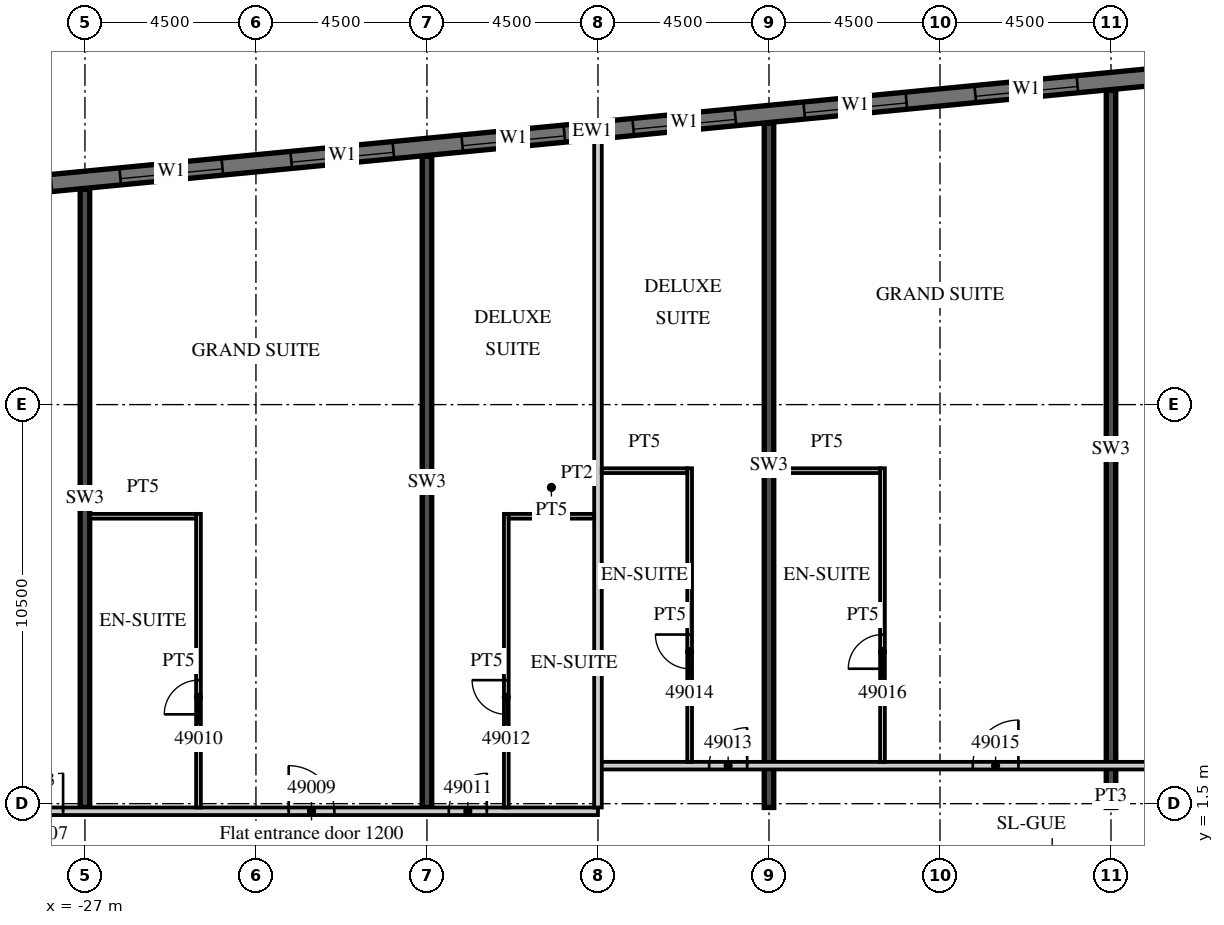
"""IFC4 building model, lengths in metres.
Left out: names, types, materials, properties, quantities, classifications, styles, units other than length and angle.
Written with IfcOpenShell. Run it as: python <this file> out.ifc"""

import sys

from ifc_helpers import new_model, si_unit, direction, frame, frame_2d, origin, place, context, subcontext, project, spatial, rectangle, extrude, element, fill, save


model = new_model("IFC4")
c1 = context("Model", 3, precision=1e-05, world=origin(), true_north=direction((0.0, 1.0)))
c2 = subcontext(c1, "Body", "Model", "MODEL_VIEW")
j1 = project(units=[si_unit("LENGTHUNIT", "METRE"), si_unit("PLANEANGLEUNIT", "RADIAN")], contexts=[c1])
p1 = place(None, origin())
s1 = spatial("IfcSite", under=j1, at=p1, CompositionType="ELEMENT")
p2 = place(p1, origin())
s2 = spatial("IfcBuilding", under=s1, at=p2, CompositionType="ELEMENT")
p3 = place(p2, frame((0.0, 0.0, 203.2)))
s3 = spatial("IfcBuildingStorey", under=s2, at=p3, CompositionType="ELEMENT", Elevation=203.2)
p4 = place(p3, frame((-27.0, 1.4, 0.0), z_axis=(0.0, 0.0, 1.0), x_axis=(0.0, 1.0, 0.0)))
e1 = element("IfcWall", 1, at=p4, inside=s3, PredefinedType="SHEAR", context=c2, shape_type="SweptSolid", body=[
    extrude(rectangle(XDim=16.268, YDim=0.25, at=frame_2d((8.134, 0.0))), origin(), (0.0, 0.0, 1.0), 3.0),
])
p5 = place(p3, frame((-18.0, 1.4, 0.0), z_axis=(0.0, 0.0, 1.0), x_axis=(0.0, 1.0, 0.0)))
e2 = element("IfcWall", 2, at=p5, inside=s3, PredefinedType="SHEAR", context=c2, shape_type="SweptSolid", body=[
    extrude(rectangle(XDim=17.134, YDim=0.25, at=frame_2d((8.567, 0.0))), origin(), (0.0, 0.0, 1.0), 3.0),
])
p6 = place(p3, frame((-9.0, 1.4, 0.0), z_axis=(0.0, 0.0, 1.0), x_axis=(0.0, 1.0, 0.0)))
e3 = element("IfcWall", 3, at=p6, inside=s3, PredefinedType="SHEAR", context=c2, shape_type="SweptSolid", body=[
    extrude(rectangle(XDim=18.001, YDim=0.25, at=frame_2d((9.0, 0.0))), origin(), (0.0, 0.0, 1.0), 3.0),
])
p7 = place(p3, frame((0.0, 1.4, 0.0), z_axis=(0.0, 0.0, 1.0), x_axis=(0.0, 1.0, 0.0)))
e4 = element("IfcWall", 4, at=p7, inside=s3, PredefinedType="SHEAR", context=c2, shape_type="SweptSolid", body=[
    extrude(rectangle(XDim=18.867, YDim=0.25, at=frame_2d((9.434, 0.0))), origin(), (0.0, 0.0, 1.0), 3.0),
])
p8 = place(p3, frame((13.521, 21.817, 0.0), z_axis=(0.0, 0.0, 1.0), x_axis=(-0.995396508751, -0.095842529008, 0.0)))
e5 = element("IfcWall", 5, at=p8, inside=s3, PredefinedType="SOLIDWALL", context=c2, shape_type="SweptSolid", body=[
    extrude(rectangle(XDim=54.591, YDim=0.45, at=frame_2d((27.296, 0.0))), origin(), (0.0, 0.0, 1.0), 3.0),
])
p9 = place(p8, frame((0.91, 0.0, 0.45)))
e6 = element("IfcOpeningElement", 6, at=p9, cuts=e5, PredefinedType="OPENING", context=c2, shape_type="SweptSolid", body=[
    extrude(rectangle(XDim=2.7, YDim=2.25, at=frame_2d((1.35, 1.125))), frame((0.0, 0.235, 0.0), z_axis=(0.0, -1.0, 0.0), x_axis=(1.0, 0.0, 0.0)), (0.0, 0.0, 1.0), 0.47),
])
p10 = place(p8, frame((5.431, 0.0, 0.45)))
e7 = element("IfcOpeningElement", 7, at=p10, cuts=e5, PredefinedType="OPENING", context=c2, shape_type="SweptSolid", body=[
    extrude(rectangle(XDim=2.7, YDim=2.25, at=frame_2d((1.35, 1.125))), frame((0.0, 0.235, 0.0), z_axis=(0.0, -1.0, 0.0), x_axis=(1.0, 0.0, 0.0)), (0.0, 0.0, 1.0), 0.47),
])
p11 = place(p8, frame((9.952, 0.0, 0.45)))
e8 = element("IfcOpeningElement", 8, at=p11, cuts=e5, PredefinedType="OPENING", context=c2, shape_type="SweptSolid", body=[
    extrude(rectangle(XDim=2.7, YDim=2.25, at=frame_2d((1.35, 1.125))), frame((0.0, 0.235, 0.0), z_axis=(0.0, -1.0, 0.0), x_axis=(1.0, 0.0, 0.0)), (0.0, 0.0, 1.0), 0.47),
])
p12 = place(p8, frame((14.473, 0.0, 0.45)))
e9 = element("IfcOpeningElement", 9, at=p12, cuts=e5, PredefinedType="OPENING", context=c2, shape_type="SweptSolid", body=[
    extrude(rectangle(XDim=2.7, YDim=2.25, at=frame_2d((1.35, 1.125))), frame((0.0, 0.235, 0.0), z_axis=(0.0, -1.0, 0.0), x_axis=(1.0, 0.0, 0.0)), (0.0, 0.0, 1.0), 0.47),
])
p13 = place(p8, frame((18.994, 0.0, 0.45)))
e10 = element("IfcOpeningElement", 10, at=p13, cuts=e5, PredefinedType="OPENING", context=c2, shape_type="SweptSolid", body=[
    extrude(rectangle(XDim=2.7, YDim=2.25, at=frame_2d((1.35, 1.125))), frame((0.0, 0.235, 0.0), z_axis=(0.0, -1.0, 0.0), x_axis=(1.0, 0.0, 0.0)), (0.0, 0.0, 1.0), 0.47),
])
p14 = place(p8, frame((23.514, 0.0, 0.45)))
e11 = element("IfcOpeningElement", 11, at=p14, cuts=e5, PredefinedType="OPENING", context=c2, shape_type="SweptSolid", body=[
    extrude(rectangle(XDim=2.7, YDim=2.25, at=frame_2d((1.35, 1.125))), frame((0.0, 0.235, 0.0), z_axis=(0.0, -1.0, 0.0), x_axis=(1.0, 0.0, 0.0)), (0.0, 0.0, 1.0), 0.47),
])
p15 = place(p8, frame((28.035, 0.0, 0.45)))
e12 = element("IfcOpeningElement", 12, at=p15, cuts=e5, PredefinedType="OPENING", context=c2, shape_type="SweptSolid", body=[
    extrude(rectangle(XDim=2.7, YDim=2.25, at=frame_2d((1.35, 1.125))), frame((0.0, 0.235, 0.0), z_axis=(0.0, -1.0, 0.0), x_axis=(1.0, 0.0, 0.0)), (0.0, 0.0, 1.0), 0.47),
])
p16 = place(p8, frame((32.556, 0.0, 0.45)))
e13 = element("IfcOpeningElement", 13, at=p16, cuts=e5, PredefinedType="OPENING", context=c2, shape_type="SweptSolid", body=[
    extrude(rectangle(XDim=2.7, YDim=2.25, at=frame_2d((1.35, 1.125))), frame((0.0, 0.235, 0.0), z_axis=(0.0, -1.0, 0.0), x_axis=(1.0, 0.0, 0.0)), (0.0, 0.0, 1.0), 0.47),
])
p17 = place(p8, frame((37.077, 0.0, 0.45)))
e14 = element("IfcOpeningElement", 14, at=p17, cuts=e5, PredefinedType="OPENING", context=c2, shape_type="SweptSolid", body=[
    extrude(rectangle(XDim=2.7, YDim=2.25, at=frame_2d((1.35, 1.125))), frame((0.0, 0.235, 0.0), z_axis=(0.0, -1.0, 0.0), x_axis=(1.0, 0.0, 0.0)), (0.0, 0.0, 1.0), 0.47),
])
p18 = place(p8, frame((41.598, 0.0, 0.45)))
e15 = element("IfcOpeningElement", 15, at=p18, cuts=e5, PredefinedType="OPENING", context=c2, shape_type="SweptSolid", body=[
    extrude(rectangle(XDim=2.7, YDim=2.25, at=frame_2d((1.35, 1.125))), frame((0.0, 0.235, 0.0), z_axis=(0.0, -1.0, 0.0), x_axis=(1.0, 0.0, 0.0)), (0.0, 0.0, 1.0), 0.47),
])
p19 = place(p8, frame((46.118, 0.0, 0.45)))
e16 = element("IfcOpeningElement", 16, at=p19, cuts=e5, PredefinedType="OPENING", context=c2, shape_type="SweptSolid", body=[
    extrude(rectangle(XDim=2.7, YDim=2.25, at=frame_2d((1.35, 1.125))), frame((0.0, 0.235, 0.0), z_axis=(0.0, -1.0, 0.0), x_axis=(1.0, 0.0, 0.0)), (0.0, 0.0, 1.0), 0.47),
])
p20 = place(p8, frame((50.629, 0.0, 0.45)))
e17 = element("IfcOpeningElement", 17, at=p20, cuts=e5, PredefinedType="OPENING", context=c2, shape_type="SweptSolid", body=[
    extrude(rectangle(XDim=2.7, YDim=2.25, at=frame_2d((1.35, 1.125))), frame((0.0, 0.235, 0.0), z_axis=(0.0, -1.0, 0.0), x_axis=(1.0, 0.0, 0.0)), (0.0, 0.0, 1.0), 0.47),
])
p21 = place(p3, frame((-42.913, 1.3, 0.0), z_axis=(0.0, 0.0, 1.0), x_axis=(1.0, 0.0, 0.0)))
e18 = element("IfcWall", 18, at=p21, inside=s3, PredefinedType="PARTITIONING", context=c2, shape_type="SweptSolid", body=[
    extrude(rectangle(XDim=29.413, YDim=0.2, at=frame_2d((14.707, 0.0))), origin(), (0.0, 0.0, 1.0), 3.0),
])
p22 = place(p21, frame((0.15, 0.0, 0.0)))
e19 = element("IfcOpeningElement", 19, at=p22, cuts=e18, PredefinedType="OPENING", context=c2, shape_type="SweptSolid", body=[
    extrude(rectangle(XDim=0.9, YDim=2.1, at=frame_2d((0.45, 1.05))), frame((0.0, 0.11, 0.0), z_axis=(0.0, -1.0, 0.0), x_axis=(1.0, 0.0, 0.0)), (0.0, 0.0, 1.0), 0.22),
])
p23 = place(p21, frame((2.963, 0.0, 0.0)))
e20 = element("IfcOpeningElement", 20, at=p23, cuts=e18, PredefinedType="OPENING", context=c2, shape_type="SweptSolid", body=[
    extrude(rectangle(XDim=1.0, YDim=2.1, at=frame_2d((0.5, 1.05))), frame((0.0, 0.11, 0.0), z_axis=(0.0, -1.0, 0.0), x_axis=(1.0, 0.0, 0.0)), (0.0, 0.0, 1.0), 0.22),
])
p24 = place(p21, frame((9.863, 0.0, 0.0)))
e21 = element("IfcOpeningElement", 21, at=p24, cuts=e18, PredefinedType="OPENING", context=c2, shape_type="SweptSolid", body=[
    extrude(rectangle(XDim=1.0, YDim=2.1, at=frame_2d((0.5, 1.05))), frame((0.0, 0.11, 0.0), z_axis=(0.0, -1.0, 0.0), x_axis=(1.0, 0.0, 0.0)), (0.0, 0.0, 1.0), 0.22),
])
p25 = place(p21, frame((14.338, 0.0, 0.0)))
e22 = element("IfcOpeningElement", 22, at=p25, cuts=e18, PredefinedType="OPENING", context=c2, shape_type="SweptSolid", body=[
    extrude(rectangle(XDim=1.0, YDim=2.1, at=frame_2d((0.5, 1.05))), frame((0.0, 0.11, 0.0), z_axis=(0.0, -1.0, 0.0), x_axis=(1.0, 0.0, 0.0)), (0.0, 0.0, 1.0), 0.22),
])
p26 = place(p21, frame((21.275, 0.0, 0.0)))
e23 = element("IfcOpeningElement", 23, at=p26, cuts=e18, PredefinedType="OPENING", context=c2, shape_type="SweptSolid", body=[
    extrude(rectangle(XDim=1.2, YDim=2.1, at=frame_2d((0.6, 1.05))), frame((0.0, 0.11, 0.0), z_axis=(0.0, -1.0, 0.0), x_axis=(1.0, 0.0, 0.0)), (0.0, 0.0, 1.0), 0.22),
])
p27 = place(p21, frame((25.488, 0.0, 0.0)))
e24 = element("IfcOpeningElement", 24, at=p27, cuts=e18, PredefinedType="OPENING", context=c2, shape_type="SweptSolid", body=[
    extrude(rectangle(XDim=1.0, YDim=2.1, at=frame_2d((0.5, 1.05))), frame((0.0, 0.11, 0.0), z_axis=(0.0, -1.0, 0.0), x_axis=(1.0, 0.0, 0.0)), (0.0, 0.0, 1.0), 0.22),
])
p28 = place(p3, frame((-13.5, 2.5, 0.0), z_axis=(0.0, 0.0, 1.0), x_axis=(1.0, 0.0, 0.0)))
e25 = element("IfcWall", 25, at=p28, inside=s3, PredefinedType="PARTITIONING", context=c2, shape_type="SweptSolid", body=[
    extrude(rectangle(XDim=27.0, YDim=0.2, at=frame_2d((13.5, 0.0))), origin(), (0.0, 0.0, 1.0), 3.0),
])
p29 = place(p28, frame((2.925, 0.0, 0.0)))
e26 = element("IfcOpeningElement", 26, at=p29, cuts=e25, PredefinedType="OPENING", context=c2, shape_type="SweptSolid", body=[
    extrude(rectangle(XDim=1.0, YDim=2.1, at=frame_2d((0.5, 1.05))), frame((0.0, 0.11, 0.0), z_axis=(0.0, -1.0, 0.0), x_axis=(1.0, 0.0, 0.0)), (0.0, 0.0, 1.0), 0.22),
])
p30 = place(p28, frame((9.863, 0.0, 0.0)))
e27 = element("IfcOpeningElement", 27, at=p30, cuts=e25, PredefinedType="OPENING", context=c2, shape_type="SweptSolid", body=[
    extrude(rectangle(XDim=1.2, YDim=2.1, at=frame_2d((0.6, 1.05))), frame((0.0, 0.11, 0.0), z_axis=(0.0, -1.0, 0.0), x_axis=(1.0, 0.0, 0.0)), (0.0, 0.0, 1.0), 0.22),
])
p31 = place(p28, frame((15.938, 0.0, 0.0)))
e28 = element("IfcOpeningElement", 28, at=p31, cuts=e25, PredefinedType="OPENING", context=c2, shape_type="SweptSolid", body=[
    extrude(rectangle(XDim=1.2, YDim=2.1, at=frame_2d((0.6, 1.05))), frame((0.0, 0.11, 0.0), z_axis=(0.0, -1.0, 0.0), x_axis=(1.0, 0.0, 0.0)), (0.0, 0.0, 1.0), 0.22),
])
p32 = place(p28, frame((23.075, 0.0, 0.0)))
e29 = element("IfcOpeningElement", 29, at=p32, cuts=e25, PredefinedType="OPENING", context=c2, shape_type="SweptSolid", body=[
    extrude(rectangle(XDim=1.0, YDim=2.1, at=frame_2d((0.5, 1.05))), frame((0.0, 0.11, 0.0), z_axis=(0.0, -1.0, 0.0), x_axis=(1.0, 0.0, 0.0)), (0.0, 0.0, 1.0), 0.22),
])
p33 = place(p3, frame((-24.012, 1.4, 0.0), z_axis=(0.0, 0.0, 1.0), x_axis=(0.0, 1.0, 0.0)))
e30 = element("IfcWall", 30, at=p33, inside=s3, PredefinedType="PARTITIONING", context=c2, shape_type="SweptSolid", body=[
    extrude(rectangle(XDim=7.725, YDim=0.125, at=frame_2d((3.863, 0.0))), origin(), (0.0, 0.0, 1.0), 3.0),
])
p34 = place(p33, frame((2.45, 0.0, 0.0)))
e31 = element("IfcOpeningElement", 31, at=p34, cuts=e30, PredefinedType="OPENING", context=c2, shape_type="SweptSolid", body=[
    extrude(rectangle(XDim=0.9, YDim=2.1, at=frame_2d((0.45, 1.05))), frame((0.0, 0.073, 0.0), z_axis=(0.0, -1.0, 0.0), x_axis=(1.0, 0.0, 0.0)), (0.0, 0.0, 1.0), 0.145),
])
p35 = place(p3, frame((-26.875, 9.062, 0.0), z_axis=(0.0, 0.0, 1.0), x_axis=(1.0, 0.0, 0.0)))
e32 = element("IfcWall", 32, at=p35, inside=s3, PredefinedType="PARTITIONING", context=c2, shape_type="SweptSolid", body=[
    extrude(rectangle(XDim=2.8, YDim=0.125, at=frame_2d((1.4, 0.0))), origin(), (0.0, 0.0, 1.0), 3.0),
])
p36 = place(p3, frame((-13.5, 1.4, 0.0), z_axis=(0.0, 0.0, 1.0), x_axis=(0.0, 1.0, 0.0)))
e33 = element("IfcWall", 33, at=p36, inside=s3, PredefinedType="PARTITIONING", context=c2, shape_type="SweptSolid", body=[
    extrude(rectangle(XDim=17.59, YDim=0.2, at=frame_2d((8.795, 0.0))), origin(), (0.0, 0.0, 1.0), 3.0),
])
p37 = place(p3, frame((-15.912, 1.4, 0.0), z_axis=(0.0, 0.0, 1.0), x_axis=(0.0, 1.0, 0.0)))
e34 = element("IfcWall", 34, at=p37, inside=s3, PredefinedType="PARTITIONING", context=c2, shape_type="SweptSolid", body=[
    extrude(rectangle(XDim=7.725, YDim=0.125, at=frame_2d((3.863, 0.0))), origin(), (0.0, 0.0, 1.0), 3.0),
])
p38 = place(p37, frame((2.45, 0.0, 0.0)))
e35 = element("IfcOpeningElement", 35, at=p38, cuts=e34, PredefinedType="OPENING", context=c2, shape_type="SweptSolid", body=[
    extrude(rectangle(XDim=0.9, YDim=2.1, at=frame_2d((0.45, 1.05))), frame((0.0, 0.073, 0.0), z_axis=(0.0, -1.0, 0.0), x_axis=(1.0, 0.0, 0.0)), (0.0, 0.0, 1.0), 0.145),
])
p39 = place(p3, frame((-15.85, 9.062, 0.0), z_axis=(0.0, 0.0, 1.0), x_axis=(1.0, 0.0, 0.0)))
e36 = element("IfcWall", 36, at=p39, inside=s3, PredefinedType="PARTITIONING", context=c2, shape_type="SweptSolid", body=[
    extrude(rectangle(XDim=2.25, YDim=0.125, at=frame_2d((1.125, 0.0))), origin(), (0.0, 0.0, 1.0), 3.0),
])
p40 = place(p3, frame((-11.088, 2.6, 0.0), z_axis=(0.0, 0.0, 1.0), x_axis=(0.0, 1.0, 0.0)))
e37 = element("IfcWall", 37, at=p40, inside=s3, PredefinedType="PARTITIONING", context=c2, shape_type="SweptSolid", body=[
    extrude(rectangle(XDim=7.725, YDim=0.125, at=frame_2d((3.862, 0.0))), origin(), (0.0, 0.0, 1.0), 3.0),
])
p41 = place(p40, frame((2.45, 0.0, 0.0)))
e38 = element("IfcOpeningElement", 38, at=p41, cuts=e37, PredefinedType="OPENING", context=c2, shape_type="SweptSolid", body=[
    extrude(rectangle(XDim=0.9, YDim=2.1, at=frame_2d((0.45, 1.05))), frame((0.0, 0.073, 0.0), z_axis=(0.0, -1.0, 0.0), x_axis=(1.0, 0.0, 0.0)), (0.0, 0.0, 1.0), 0.145),
])
p42 = place(p3, frame((-13.4, 10.262, 0.0), z_axis=(0.0, 0.0, 1.0), x_axis=(1.0, 0.0, 0.0)))
e39 = element("IfcWall", 39, at=p42, inside=s3, PredefinedType="PARTITIONING", context=c2, shape_type="SweptSolid", body=[
    extrude(rectangle(XDim=2.25, YDim=0.125, at=frame_2d((1.125, 0.0))), origin(), (0.0, 0.0, 1.0), 3.0),
])
p43 = place(p3, frame((-6.013, 2.6, 0.0), z_axis=(0.0, 0.0, 1.0), x_axis=(0.0, 1.0, 0.0)))
e40 = element("IfcWall", 40, at=p43, inside=s3, PredefinedType="PARTITIONING", context=c2, shape_type="SweptSolid", body=[
    extrude(rectangle(XDim=7.725, YDim=0.125, at=frame_2d((3.862, 0.0))), origin(), (0.0, 0.0, 1.0), 3.0),
])
p44 = place(p43, frame((2.45, 0.0, 0.0)))
e41 = element("IfcOpeningElement", 41, at=p44, cuts=e40, PredefinedType="OPENING", context=c2, shape_type="SweptSolid", body=[
    extrude(rectangle(XDim=0.9, YDim=2.1, at=frame_2d((0.45, 1.05))), frame((0.0, 0.073, 0.0), z_axis=(0.0, -1.0, 0.0), x_axis=(1.0, 0.0, 0.0)), (0.0, 0.0, 1.0), 0.145),
])
p45 = place(p3, frame((-8.875, 10.262, 0.0), z_axis=(0.0, 0.0, 1.0), x_axis=(1.0, 0.0, 0.0)))
e42 = element("IfcWall", 42, at=p45, inside=s3, PredefinedType="PARTITIONING", context=c2, shape_type="SweptSolid", body=[
    extrude(rectangle(XDim=2.8, YDim=0.125, at=frame_2d((1.4, 0.0))), origin(), (0.0, 0.0, 1.0), 3.0),
])
p46 = place(p12, origin())
e43 = element("IfcWindow", 43, at=p46, inside=s3, PartitioningType="SINGLE_PANEL", PredefinedType="WINDOW", context=c2, shape_type="SweptSolid", body=[
    extrude(rectangle(XDim=2.7, YDim=2.25, at=frame_2d((1.35, 1.125))), frame((0.0, 0.09, 0.0), z_axis=(0.0, -1.0, 0.0), x_axis=(1.0, 0.0, 0.0)), (0.0, 0.0, 1.0), 0.06),
])
fill(e9, e43)
p47 = place(p13, origin())
e44 = element("IfcWindow", 44, at=p47, inside=s3, PartitioningType="SINGLE_PANEL", PredefinedType="WINDOW", context=c2, shape_type="SweptSolid", body=[
    extrude(rectangle(XDim=2.7, YDim=2.25, at=frame_2d((1.35, 1.125))), frame((0.0, 0.09, 0.0), z_axis=(0.0, -1.0, 0.0), x_axis=(1.0, 0.0, 0.0)), (0.0, 0.0, 1.0), 0.06),
])
fill(e10, e44)
p48 = place(p14, origin())
e45 = element("IfcWindow", 45, at=p48, inside=s3, PartitioningType="SINGLE_PANEL", PredefinedType="WINDOW", context=c2, shape_type="SweptSolid", body=[
    extrude(rectangle(XDim=2.7, YDim=2.25, at=frame_2d((1.35, 1.125))), frame((0.0, 0.09, 0.0), z_axis=(0.0, -1.0, 0.0), x_axis=(1.0, 0.0, 0.0)), (0.0, 0.0, 1.0), 0.06),
])
fill(e11, e45)
p49 = place(p15, origin())
e46 = element("IfcWindow", 46, at=p49, inside=s3, PartitioningType="SINGLE_PANEL", PredefinedType="WINDOW", context=c2, shape_type="SweptSolid", body=[
    extrude(rectangle(XDim=2.7, YDim=2.25, at=frame_2d((1.35, 1.125))), frame((0.0, 0.09, 0.0), z_axis=(0.0, -1.0, 0.0), x_axis=(1.0, 0.0, 0.0)), (0.0, 0.0, 1.0), 0.06),
])
fill(e12, e46)
p50 = place(p16, origin())
e47 = element("IfcWindow", 47, at=p50, inside=s3, PartitioningType="SINGLE_PANEL", PredefinedType="WINDOW", context=c2, shape_type="SweptSolid", body=[
    extrude(rectangle(XDim=2.7, YDim=2.25, at=frame_2d((1.35, 1.125))), frame((0.0, 0.09, 0.0), z_axis=(0.0, -1.0, 0.0), x_axis=(1.0, 0.0, 0.0)), (0.0, 0.0, 1.0), 0.06),
])
fill(e13, e47)
p51 = place(p17, origin())
e48 = element("IfcWindow", 48, at=p51, inside=s3, PartitioningType="SINGLE_PANEL", PredefinedType="WINDOW", context=c2, shape_type="SweptSolid", body=[
    extrude(rectangle(XDim=2.7, YDim=2.25, at=frame_2d((1.35, 1.125))), frame((0.0, 0.09, 0.0), z_axis=(0.0, -1.0, 0.0), x_axis=(1.0, 0.0, 0.0)), (0.0, 0.0, 1.0), 0.06),
])
fill(e14, e48)
p52 = place(p25, origin())
e49 = element("IfcDoor", 49, at=p52, inside=s3, OperationType="SINGLE_SWING_RIGHT", PredefinedType="DOOR", context=c2, shape_type="SweptSolid", body=[
    extrude(rectangle(XDim=1.0, YDim=2.1, at=frame_2d((0.5, 1.05))), frame((0.0, 0.025, 0.0), z_axis=(0.0, -1.0, 0.0), x_axis=(1.0, 0.0, 0.0)), (0.0, 0.0, 1.0), 0.05),
])
fill(e22, e49)
p53 = place(p26, origin())
e50 = element("IfcDoor", 50, at=p53, inside=s3, OperationType="SINGLE_SWING_LEFT", PredefinedType="DOOR", context=c2, shape_type="SweptSolid", body=[
    extrude(rectangle(XDim=1.2, YDim=2.1, at=frame_2d((0.6, 1.05))), frame((0.0, 0.025, 0.0), z_axis=(0.0, -1.0, 0.0), x_axis=(1.0, 0.0, 0.0)), (0.0, 0.0, 1.0), 0.05),
])
fill(e23, e50)
p54 = place(p34, origin())
e51 = element("IfcDoor", 51, at=p54, inside=s3, OperationType="SINGLE_SWING_LEFT", PredefinedType="DOOR", context=c2, shape_type="SweptSolid", body=[
    extrude(rectangle(XDim=0.9, YDim=2.1, at=frame_2d((0.45, 1.05))), frame((0.0, 0.025, 0.0), z_axis=(0.0, -1.0, 0.0), x_axis=(1.0, 0.0, 0.0)), (0.0, 0.0, 1.0), 0.05),
])
fill(e31, e51)
p55 = place(p27, origin())
e52 = element("IfcDoor", 52, at=p55, inside=s3, OperationType="SINGLE_SWING_RIGHT", PredefinedType="DOOR", context=c2, shape_type="SweptSolid", body=[
    extrude(rectangle(XDim=1.0, YDim=2.1, at=frame_2d((0.5, 1.05))), frame((0.0, 0.025, 0.0), z_axis=(0.0, -1.0, 0.0), x_axis=(1.0, 0.0, 0.0)), (0.0, 0.0, 1.0), 0.05),
])
fill(e24, e52)
p56 = place(p38, origin())
e53 = element("IfcDoor", 53, at=p56, inside=s3, OperationType="SINGLE_SWING_RIGHT", PredefinedType="DOOR", context=c2, shape_type="SweptSolid", body=[
    extrude(rectangle(XDim=0.9, YDim=2.1, at=frame_2d((0.45, 1.05))), frame((0.0, 0.025, 0.0), z_axis=(0.0, -1.0, 0.0), x_axis=(1.0, 0.0, 0.0)), (0.0, 0.0, 1.0), 0.05),
])
fill(e35, e53)
p57 = place(p29, origin())
e54 = element("IfcDoor", 54, at=p57, inside=s3, OperationType="SINGLE_SWING_RIGHT", PredefinedType="DOOR", context=c2, shape_type="SweptSolid", body=[
    extrude(rectangle(XDim=1.0, YDim=2.1, at=frame_2d((0.5, 1.05))), frame((0.0, 0.025, 0.0), z_axis=(0.0, -1.0, 0.0), x_axis=(1.0, 0.0, 0.0)), (0.0, 0.0, 1.0), 0.05),
])
fill(e26, e54)
p58 = place(p41, origin())
e55 = element("IfcDoor", 55, at=p58, inside=s3, OperationType="SINGLE_SWING_RIGHT", PredefinedType="DOOR", context=c2, shape_type="SweptSolid", body=[
    extrude(rectangle(XDim=0.9, YDim=2.1, at=frame_2d((0.45, 1.05))), frame((0.0, 0.025, 0.0), z_axis=(0.0, -1.0, 0.0), x_axis=(1.0, 0.0, 0.0)), (0.0, 0.0, 1.0), 0.05),
])
fill(e38, e55)
p59 = place(p30, origin())
e56 = element("IfcDoor", 56, at=p59, inside=s3, OperationType="SINGLE_SWING_RIGHT", PredefinedType="DOOR", context=c2, shape_type="SweptSolid", body=[
    extrude(rectangle(XDim=1.2, YDim=2.1, at=frame_2d((0.6, 1.05))), frame((0.0, 0.025, 0.0), z_axis=(0.0, -1.0, 0.0), x_axis=(1.0, 0.0, 0.0)), (0.0, 0.0, 1.0), 0.05),
])
fill(e27, e56)
p60 = place(p44, origin())
e57 = element("IfcDoor", 57, at=p60, inside=s3, OperationType="SINGLE_SWING_LEFT", PredefinedType="DOOR", context=c2, shape_type="SweptSolid", body=[
    extrude(rectangle(XDim=0.9, YDim=2.1, at=frame_2d((0.45, 1.05))), frame((0.0, 0.025, 0.0), z_axis=(0.0, -1.0, 0.0), x_axis=(1.0, 0.0, 0.0)), (0.0, 0.0, 1.0), 0.05),
])
fill(e41, e57)
save(model, sys.argv[1])
